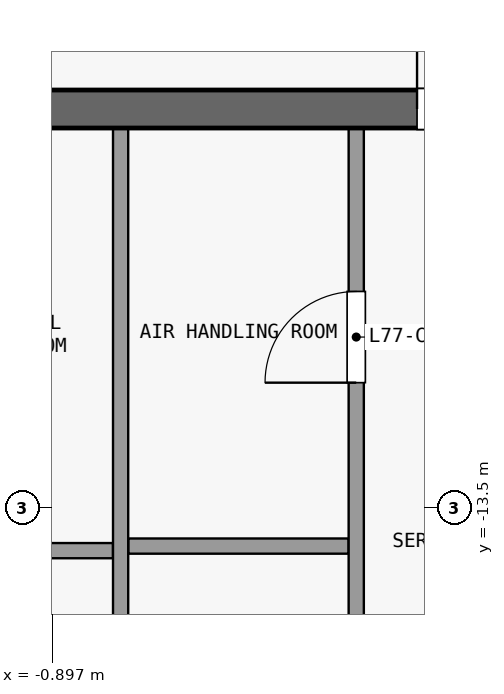
"""IFC4 building model, lengths in metres.
Left out: names, types, materials, properties, quantities, classifications, styles, units other than length and angle.
Written with IfcOpenShell. Run it as: python <this file> out.ifc"""

import sys

from ifc_helpers import new_model, si_unit, direction, frame, frame_2d, origin, place, context, subcontext, project, spatial, rectangle, extrude, element, fill, save


model = new_model("IFC4")
c1 = context("Model", 3, precision=1e-05, world=origin(), true_north=direction((0.0, 1.0)))
c2 = subcontext(c1, "Body", "Model", "MODEL_VIEW")
j1 = project(units=[si_unit("LENGTHUNIT", "METRE"), si_unit("PLANEANGLEUNIT", "RADIAN")], contexts=[c1])
p1 = place(None, origin())
s1 = spatial("IfcSite", under=j1, at=p1, CompositionType="ELEMENT")
p2 = place(p1, origin())
s2 = spatial("IfcBuilding", under=s1, at=p2, CompositionType="ELEMENT")
p3 = place(p2, frame((0.0, 0.0, 303.2)))
s3 = spatial("IfcBuildingStorey", under=s2, at=p3, CompositionType="ELEMENT", Elevation=303.2)
p4 = place(p3, frame((-13.1, -8.25, 0.0), z_axis=(0.0, 0.0, 1.0), x_axis=(1.0, 0.0, 0.0)))
e1 = element("IfcWall", 1, at=p4, inside=s3, PredefinedType="SHEAR", context=c2, shape_type="SweptSolid", body=[
    extrude(rectangle(XDim=26.2, YDim=0.5, at=frame_2d((13.1, 0.0))), origin(), (0.0, 0.0, 1.0), 4.2),
])
p5 = place(p4, frame((7.4, 0.0, 0.0)))
e2 = element("IfcOpeningElement", 2, at=p5, cuts=e1, PredefinedType="OPENING", context=c2, shape_type="SweptSolid", body=[
    extrude(rectangle(XDim=1.8, YDim=2.1, at=frame_2d((0.9, 1.05))), frame((0.0, 0.26, 0.0), z_axis=(0.0, -1.0, 0.0), x_axis=(1.0, 0.0, 0.0)), (0.0, 0.0, 1.0), 0.52),
])
p6 = place(p4, frame((17.0, 0.0, 0.0)))
e3 = element("IfcOpeningElement", 3, at=p6, cuts=e1, PredefinedType="OPENING", context=c2, shape_type="SweptSolid", body=[
    extrude(rectangle(XDim=1.8, YDim=2.1, at=frame_2d((0.9, 1.05))), frame((0.0, 0.26, 0.0), z_axis=(0.0, -1.0, 0.0), x_axis=(1.0, 0.0, 0.0)), (0.0, 0.0, 1.0), 0.52),
])
p7 = place(p4, frame((1.325, 0.0, 0.0)))
e4 = element("IfcOpeningElement", 4, at=p7, cuts=e1, PredefinedType="OPENING", context=c2, shape_type="SweptSolid", body=[
    extrude(rectangle(XDim=1.2, YDim=2.1, at=frame_2d((0.6, 1.05))), frame((0.0, 0.26, 0.0), z_axis=(0.0, -1.0, 0.0), x_axis=(1.0, 0.0, 0.0)), (0.0, 0.0, 1.0), 0.52),
])
p8 = place(p4, frame((22.975, 0.0, 0.0)))
e5 = element("IfcOpeningElement", 5, at=p8, cuts=e1, PredefinedType="OPENING", context=c2, shape_type="SweptSolid", body=[
    extrude(rectangle(XDim=0.9, YDim=2.1, at=frame_2d((0.45, 1.05))), frame((0.0, 0.26, 0.0), z_axis=(0.0, -1.0, 0.0), x_axis=(1.0, 0.0, 0.0)), (0.0, 0.0, 1.0), 0.52),
])
for number, where, z_axis, x_axis in (
    (6, (-3.0, -14.06, 0.0), (0.0, 0.0, 1.0), (1.0, 0.0, 0.0)),
    (7, (0.1, -14.0, 0.0), (0.0, 0.0, 1.0), (1.0, 0.0, 0.0)),
):
    element("IfcWall", number, at=place(p3, frame(where, z_axis=z_axis, x_axis=x_axis)), inside=s3, PredefinedType="PARTITIONING", context=c2, shape_type="SweptSolid", body=[
        extrude(rectangle(XDim=2.9, YDim=0.2, at=frame_2d((1.45, 0.0))), origin(), (0.0, 0.0, 1.0), 4.2),
    ])
p9 = place(p3, frame((0.0, -19.35, 0.0), z_axis=(0.0, 0.0, 1.0), x_axis=(0.0, 1.0, 0.0)))
e8 = element("IfcWall", 8, at=p9, inside=s3, PredefinedType="PARTITIONING", context=c2, shape_type="SweptSolid", body=[
    extrude(rectangle(XDim=10.85, YDim=0.2, at=frame_2d((5.425, 0.0))), origin(), (0.0, 0.0, 1.0), 4.2),
])
p10 = place(p3, frame((3.1, -19.6, 0.0), z_axis=(0.0, 0.0, 1.0), x_axis=(0.0, 1.0, 0.0)))
e9 = element("IfcWall", 9, at=p10, inside=s3, PredefinedType="PARTITIONING", context=c2, shape_type="SweptSolid", body=[
    extrude(rectangle(XDim=11.1, YDim=0.2, at=frame_2d((5.55, 0.0))), origin(), (0.0, 0.0, 1.0), 4.2),
])
p11 = place(p10, frame((2.25, 0.0, 0.0)))
e10 = element("IfcOpeningElement", 10, at=p11, cuts=e9, PredefinedType="OPENING", context=c2, shape_type="SweptSolid", body=[
    extrude(rectangle(XDim=1.2, YDim=2.1, at=frame_2d((0.6, 1.05))), frame((0.0, 0.11, 0.0), z_axis=(0.0, -1.0, 0.0), x_axis=(1.0, 0.0, 0.0)), (0.0, 0.0, 1.0), 0.22),
])
p12 = place(p10, frame((7.75, 0.0, 0.0)))
e11 = element("IfcOpeningElement", 11, at=p12, cuts=e9, PredefinedType="OPENING", context=c2, shape_type="SweptSolid", body=[
    extrude(rectangle(XDim=1.2, YDim=2.1, at=frame_2d((0.6, 1.05))), frame((0.0, 0.11, 0.0), z_axis=(0.0, -1.0, 0.0), x_axis=(1.0, 0.0, 0.0)), (0.0, 0.0, 1.0), 0.22),
])
p13 = place(p6, origin())
e12 = element("IfcDoor", 12, at=p13, inside=s3, OperationType="DOUBLE_DOOR_SINGLE_SWING", PredefinedType="DOOR", context=c2, shape_type="SweptSolid", body=[
    extrude(rectangle(XDim=1.8, YDim=2.1, at=frame_2d((0.9, 1.05))), frame((0.0, 0.025, 0.0), z_axis=(0.0, -1.0, 0.0), x_axis=(1.0, 0.0, 0.0)), (0.0, 0.0, 1.0), 0.05),
])
fill(e3, e12)
p14 = place(p12, origin())
e13 = element("IfcDoor", 13, at=p14, inside=s3, OperationType="SINGLE_SWING_LEFT", PredefinedType="DOOR", context=c2, shape_type="SweptSolid", body=[
    extrude(rectangle(XDim=1.2, YDim=2.1, at=frame_2d((0.6, 1.05))), frame((0.0, 0.025, 0.0), z_axis=(0.0, -1.0, 0.0), x_axis=(1.0, 0.0, 0.0)), (0.0, 0.0, 1.0), 0.05),
])
fill(e11, e13)
save(model, sys.argv[1])
